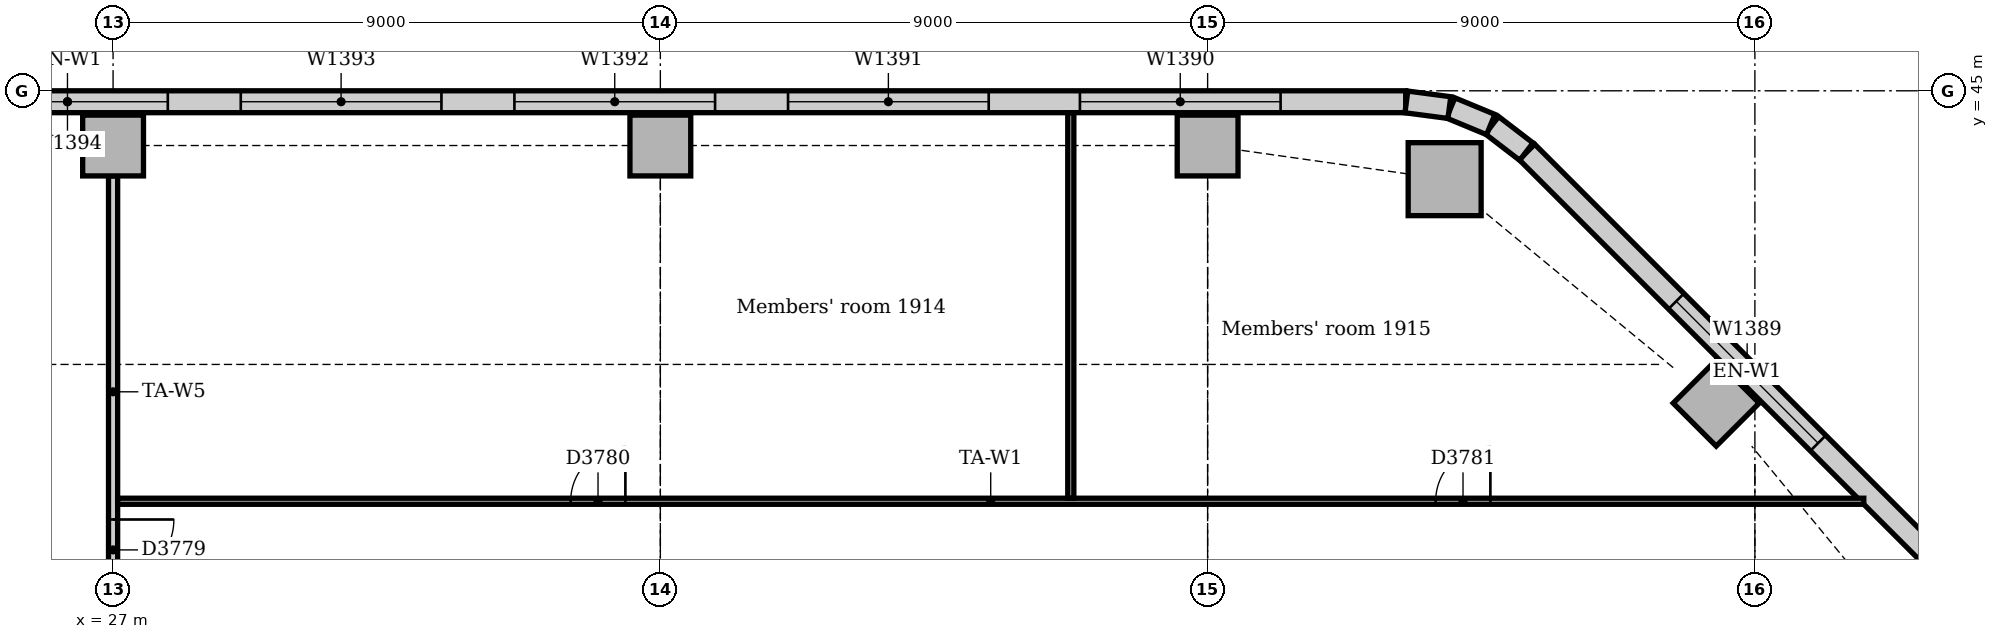
"""IFC4 building model, lengths in metres.
Left out: names, types, materials, properties, quantities, classifications, styles, units other than length and angle.
Written with IfcOpenShell. Run it as: python <this file> out.ifc"""

import sys

from ifc_helpers import new_model, si_unit, direction, frame, frame_2d, origin, origin_2d, place, context, subcontext, project, spatial, rectangle, extrude, element, fill, save


model = new_model("IFC4")
c1 = context("Model", 3, precision=1e-05, world=origin(), true_north=direction((0.0, 1.0)))
c2 = subcontext(c1, "Body", "Model", "MODEL_VIEW")
j1 = project(units=[si_unit("LENGTHUNIT", "METRE"), si_unit("PLANEANGLEUNIT", "RADIAN")], contexts=[c1])
p1 = place(None, origin())
s1 = spatial("IfcSite", under=j1, at=p1, CompositionType="ELEMENT")
p2 = place(p1, origin())
s2 = spatial("IfcBuilding", under=s1, at=p2, CompositionType="ELEMENT")
p3 = place(p2, frame((0.0, 0.0, 83.0)))
s3 = spatial("IfcBuildingStorey", under=s2, at=p3, CompositionType="ELEMENT", Elevation=83.0)
p4 = place(p3, frame((48.898, 43.547, 0.0), z_axis=(0.0, 0.0, 1.0), x_axis=(1.0, 0.0, 0.0)))
e1 = element("IfcColumn", 1, at=p4, inside=s3, PredefinedType="COLUMN", context=c2, shape_type="SweptSolid", body=[
    extrude(rectangle(XDim=1.2, YDim=1.2, at=origin_2d()), origin(), (0.0, 0.0, 1.0), 3.85),
])
for number, where, z_axis, x_axis in (
    (2, (53.364, 39.864, 0.0), (0.0, 0.0, 1.0), (0.707, 0.707, 0.0)),
    (3, (27.0, 44.1, 0.0), (0.0, 0.0, 1.0), (1.0, 0.0, 0.0)),
    (4, (36.0, 44.1, 0.0), (0.0, 0.0, 1.0), (1.0, 0.0, 0.0)),
    (5, (45.0, 44.1, 0.0), (0.0, 0.0, 1.0), (1.0, 0.0, 0.0)),
):
    element("IfcColumn", number, at=place(p3, frame(where, z_axis=z_axis, x_axis=x_axis)), inside=s3, PredefinedType="COLUMN", context=c2, shape_type="SweptSolid", body=[
        extrude(rectangle(XDim=1.0, YDim=1.0, at=origin_2d()), origin(), (0.0, 0.0, 1.0), 3.85),
    ])
p5 = place(p3, frame((57.494, 36.751, 0.0), z_axis=(0.0, 0.0, 1.0), x_axis=(-0.707106781187, 0.707106781187, 0.0)))
e6 = element("IfcWall", 6, at=p5, inside=s3, PredefinedType="STANDARD", context=c2, shape_type="SweptSolid", body=[
    extrude(rectangle(XDim=10.243, YDim=0.36, at=frame_2d((5.121, 0.0))), origin(), (0.0, 0.0, 1.0), 3.85),
])
p6 = place(p5, frame((3.471, 0.0, 0.9)))
e7 = element("IfcOpeningElement", 7, at=p6, cuts=e6, PredefinedType="OPENING", context=c2, shape_type="SweptSolid", body=[
    extrude(rectangle(XDim=3.3, YDim=1.6, at=frame_2d((1.65, 0.8))), frame((0.0, 0.19, 0.0), z_axis=(0.0, -1.0, 0.0), x_axis=(1.0, 0.0, 0.0)), (0.0, 0.0, 1.0), 0.38),
])
p7 = place(p3, frame((48.257, 44.82, 0.0), z_axis=(0.0, 0.0, 1.0), x_axis=(-1.0, 0.0, 0.0)))
e8 = element("IfcWall", 8, at=p7, inside=s3, PredefinedType="STANDARD", context=c2, shape_type="SweptSolid", body=[
    extrude(rectangle(XDim=44.015, YDim=0.36, at=frame_2d((22.007, 0.0))), origin(), (0.0, 0.0, 1.0), 3.85),
])
p8 = place(p7, frame((2.057, 0.0, 0.9)))
e9 = element("IfcOpeningElement", 9, at=p8, cuts=e8, PredefinedType="OPENING", context=c2, shape_type="SweptSolid", body=[
    extrude(rectangle(XDim=3.3, YDim=1.6, at=frame_2d((1.65, 0.8))), frame((0.0, 0.19, 0.0), z_axis=(0.0, -1.0, 0.0), x_axis=(1.0, 0.0, 0.0)), (0.0, 0.0, 1.0), 0.38),
])
p9 = place(p7, frame((6.857, 0.0, 0.9)))
e10 = element("IfcOpeningElement", 10, at=p9, cuts=e8, PredefinedType="OPENING", context=c2, shape_type="SweptSolid", body=[
    extrude(rectangle(XDim=3.3, YDim=1.6, at=frame_2d((1.65, 0.8))), frame((0.0, 0.19, 0.0), z_axis=(0.0, -1.0, 0.0), x_axis=(1.0, 0.0, 0.0)), (0.0, 0.0, 1.0), 0.38),
])
p10 = place(p7, frame((11.357, 0.0, 0.9)))
e11 = element("IfcOpeningElement", 11, at=p10, cuts=e8, PredefinedType="OPENING", context=c2, shape_type="SweptSolid", body=[
    extrude(rectangle(XDim=3.3, YDim=1.6, at=frame_2d((1.65, 0.8))), frame((0.0, 0.19, 0.0), z_axis=(0.0, -1.0, 0.0), x_axis=(1.0, 0.0, 0.0)), (0.0, 0.0, 1.0), 0.38),
])
p11 = place(p7, frame((15.857, 0.0, 0.9)))
e12 = element("IfcOpeningElement", 12, at=p11, cuts=e8, PredefinedType="OPENING", context=c2, shape_type="SweptSolid", body=[
    extrude(rectangle(XDim=3.3, YDim=1.6, at=frame_2d((1.65, 0.8))), frame((0.0, 0.19, 0.0), z_axis=(0.0, -1.0, 0.0), x_axis=(1.0, 0.0, 0.0)), (0.0, 0.0, 1.0), 0.38),
])
p12 = place(p7, frame((20.357, 0.0, 0.9)))
e13 = element("IfcOpeningElement", 13, at=p12, cuts=e8, PredefinedType="OPENING", context=c2, shape_type="SweptSolid", body=[
    extrude(rectangle(XDim=3.3, YDim=1.6, at=frame_2d((1.65, 0.8))), frame((0.0, 0.19, 0.0), z_axis=(0.0, -1.0, 0.0), x_axis=(1.0, 0.0, 0.0)), (0.0, 0.0, 1.0), 0.38),
])
p13 = place(p7, frame((25.957, 0.0, 0.9)))
e14 = element("IfcOpeningElement", 14, at=p13, cuts=e8, PredefinedType="OPENING", context=c2, shape_type="SweptSolid", body=[
    extrude(rectangle(XDim=1.8, YDim=1.6, at=frame_2d((0.9, 0.8))), frame((0.0, 0.19, 0.0), z_axis=(0.0, -1.0, 0.0), x_axis=(1.0, 0.0, 0.0)), (0.0, 0.0, 1.0), 0.38),
])
p14 = place(p7, frame((29.357, 0.0, 0.9)))
e15 = element("IfcOpeningElement", 15, at=p14, cuts=e8, PredefinedType="OPENING", context=c2, shape_type="SweptSolid", body=[
    extrude(rectangle(XDim=3.3, YDim=1.6, at=frame_2d((1.65, 0.8))), frame((0.0, 0.19, 0.0), z_axis=(0.0, -1.0, 0.0), x_axis=(1.0, 0.0, 0.0)), (0.0, 0.0, 1.0), 0.38),
])
p15 = place(p7, frame((33.857, 0.0, 0.9)))
e16 = element("IfcOpeningElement", 16, at=p15, cuts=e8, PredefinedType="OPENING", context=c2, shape_type="SweptSolid", body=[
    extrude(rectangle(XDim=3.3, YDim=1.6, at=frame_2d((1.65, 0.8))), frame((0.0, 0.19, 0.0), z_axis=(0.0, -1.0, 0.0), x_axis=(1.0, 0.0, 0.0)), (0.0, 0.0, 1.0), 0.38),
])
p16 = place(p7, frame((38.357, 0.0, 0.9)))
e17 = element("IfcOpeningElement", 17, at=p16, cuts=e8, PredefinedType="OPENING", context=c2, shape_type="SweptSolid", body=[
    extrude(rectangle(XDim=3.3, YDim=1.6, at=frame_2d((1.65, 0.8))), frame((0.0, 0.19, 0.0), z_axis=(0.0, -1.0, 0.0), x_axis=(1.0, 0.0, 0.0)), (0.0, 0.0, 1.0), 0.38),
])
p17 = place(p3, frame((50.241, 44.0, 0.0), z_axis=(0.0, 0.0, 1.0), x_axis=(-0.793321924995, 0.608802368033, 0.0)))
e18 = element("IfcWall", 18, at=p17, inside=s3, PredefinedType="STANDARD", context=c2, shape_type="SweptSolid", body=[
    extrude(rectangle(XDim=0.713, YDim=0.36, at=frame_2d((0.357, 0.0))), origin(), (0.0, 0.0, 1.0), 3.85),
])
for number, where, z_axis, x_axis in (
    (19, (49.656, 44.445, 0.0), (0.0, 0.0, 1.0), (-0.924, 0.383, 0.0)),
    (20, (48.976, 44.724, 0.0), (0.0, 0.0, 1.0), (-0.991, 0.131, 0.0)),
):
    element("IfcWall", number, at=place(p3, frame(where, z_axis=z_axis, x_axis=x_axis)), inside=s3, PredefinedType="STANDARD", context=c2, shape_type="SweptSolid", body=[
        extrude(rectangle(XDim=0.713, YDim=0.36, at=frame_2d((0.356, 0.0))), origin(), (0.0, 0.0, 1.0), 3.85),
    ])
p18 = place(p3, frame((27.0, 36.5, 0.0), z_axis=(0.0, 0.0, 1.0), x_axis=(0.0, 1.0, 0.0)))
e21 = element("IfcWall", 21, at=p18, inside=s3, PredefinedType="PARTITIONING", context=c2, shape_type="SweptSolid", body=[
    extrude(rectangle(XDim=7.1, YDim=0.15, at=frame_2d((3.55, 0.0))), origin(), (0.0, 0.0, 1.0), 3.158),
])
p19 = place(p18, frame((0.45, 0.0, 0.0)))
e22 = element("IfcOpeningElement", 22, at=p19, cuts=e21, PredefinedType="OPENING", context=c2, shape_type="SweptSolid", body=[
    extrude(rectangle(XDim=1.0, YDim=2.1, at=frame_2d((0.5, 1.05))), frame((0.0, 0.085, 0.0), z_axis=(0.0, -1.0, 0.0), x_axis=(1.0, 0.0, 0.0)), (0.0, 0.0, 1.0), 0.17),
])
p20 = place(p3, frame((27.075, 38.25, 0.0), z_axis=(0.0, 0.0, 1.0), x_axis=(1.0, 0.0, 0.0)))
e23 = element("IfcWall", 23, at=p20, inside=s3, PredefinedType="PARTITIONING", context=c2, shape_type="SweptSolid", body=[
    extrude(rectangle(XDim=28.716, YDim=0.1, at=frame_2d((14.358, 0.0))), origin(), (0.0, 0.0, 1.0), 3.85),
])
p21 = place(p20, frame((7.45, 0.0, 0.0)))
e24 = element("IfcOpeningElement", 24, at=p21, cuts=e23, PredefinedType="OPENING", context=c2, shape_type="SweptSolid", body=[
    extrude(rectangle(XDim=0.9, YDim=2.1, at=frame_2d((0.45, 1.05))), frame((0.0, 0.06, 0.0), z_axis=(0.0, -1.0, 0.0), x_axis=(1.0, 0.0, 0.0)), (0.0, 0.0, 1.0), 0.12),
])
p22 = place(p20, frame((21.675, 0.0, 0.0)))
e25 = element("IfcOpeningElement", 25, at=p22, cuts=e23, PredefinedType="OPENING", context=c2, shape_type="SweptSolid", body=[
    extrude(rectangle(XDim=0.9, YDim=2.1, at=frame_2d((0.45, 1.05))), frame((0.0, 0.06, 0.0), z_axis=(0.0, -1.0, 0.0), x_axis=(1.0, 0.0, 0.0)), (0.0, 0.0, 1.0), 0.12),
])
p23 = place(p3, frame((42.75, 38.3, 0.0), z_axis=(0.0, 0.0, 1.0), x_axis=(0.0, 1.0, 0.0)))
e26 = element("IfcWall", 26, at=p23, inside=s3, PredefinedType="PARTITIONING", context=c2, shape_type="SweptSolid", body=[
    extrude(rectangle(XDim=6.34, YDim=0.1, at=frame_2d((3.17, 0.0))), origin(), (0.0, 0.0, 1.0), 3.85),
])
p24 = place(p6, origin())
e27 = element("IfcWindow", 27, at=p24, inside=s3, PartitioningType="SINGLE_PANEL", PredefinedType="WINDOW", context=c2, shape_type="SweptSolid", body=[
    extrude(rectangle(XDim=3.3, YDim=1.6, at=frame_2d((1.65, 0.8))), frame((0.0, 0.13, 0.0), z_axis=(0.0, -1.0, 0.0), x_axis=(1.0, 0.0, 0.0)), (0.0, 0.0, 1.0), 0.06),
])
fill(e7, e27)
p25 = place(p8, origin())
e28 = element("IfcWindow", 28, at=p25, inside=s3, PartitioningType="SINGLE_PANEL", PredefinedType="WINDOW", context=c2, shape_type="SweptSolid", body=[
    extrude(rectangle(XDim=3.3, YDim=1.6, at=frame_2d((1.65, 0.8))), frame((0.0, 0.13, 0.0), z_axis=(0.0, -1.0, 0.0), x_axis=(1.0, 0.0, 0.0)), (0.0, 0.0, 1.0), 0.06),
])
fill(e9, e28)
p26 = place(p9, origin())
e29 = element("IfcWindow", 29, at=p26, inside=s3, PartitioningType="SINGLE_PANEL", PredefinedType="WINDOW", context=c2, shape_type="SweptSolid", body=[
    extrude(rectangle(XDim=3.3, YDim=1.6, at=frame_2d((1.65, 0.8))), frame((0.0, 0.13, 0.0), z_axis=(0.0, -1.0, 0.0), x_axis=(1.0, 0.0, 0.0)), (0.0, 0.0, 1.0), 0.06),
])
fill(e10, e29)
p27 = place(p10, origin())
e30 = element("IfcWindow", 30, at=p27, inside=s3, PartitioningType="SINGLE_PANEL", PredefinedType="WINDOW", context=c2, shape_type="SweptSolid", body=[
    extrude(rectangle(XDim=3.3, YDim=1.6, at=frame_2d((1.65, 0.8))), frame((0.0, 0.13, 0.0), z_axis=(0.0, -1.0, 0.0), x_axis=(1.0, 0.0, 0.0)), (0.0, 0.0, 1.0), 0.06),
])
fill(e11, e30)
p28 = place(p11, origin())
e31 = element("IfcWindow", 31, at=p28, inside=s3, PartitioningType="SINGLE_PANEL", PredefinedType="WINDOW", context=c2, shape_type="SweptSolid", body=[
    extrude(rectangle(XDim=3.3, YDim=1.6, at=frame_2d((1.65, 0.8))), frame((0.0, 0.13, 0.0), z_axis=(0.0, -1.0, 0.0), x_axis=(1.0, 0.0, 0.0)), (0.0, 0.0, 1.0), 0.06),
])
fill(e12, e31)
p29 = place(p12, origin())
e32 = element("IfcWindow", 32, at=p29, inside=s3, PartitioningType="SINGLE_PANEL", PredefinedType="WINDOW", context=c2, shape_type="SweptSolid", body=[
    extrude(rectangle(XDim=3.3, YDim=1.6, at=frame_2d((1.65, 0.8))), frame((0.0, 0.13, 0.0), z_axis=(0.0, -1.0, 0.0), x_axis=(1.0, 0.0, 0.0)), (0.0, 0.0, 1.0), 0.06),
])
fill(e13, e32)
p30 = place(p19, frame((1.0, 0.0, 0.0), z_axis=(0.0, 0.0, 1.0), x_axis=(-1.0, 0.0, 0.0)))
e33 = element("IfcDoor", 33, at=p30, inside=s3, OperationType="SINGLE_SWING_LEFT", PredefinedType="DOOR", context=c2, shape_type="SweptSolid", body=[
    extrude(rectangle(XDim=1.0, YDim=2.1, at=frame_2d((0.5, 1.05))), frame((0.0, 0.025, 0.0), z_axis=(0.0, -1.0, 0.0), x_axis=(1.0, 0.0, 0.0)), (0.0, 0.0, 1.0), 0.05),
])
fill(e22, e33)
p31 = place(p21, origin())
e34 = element("IfcDoor", 34, at=p31, inside=s3, OperationType="SINGLE_SWING_RIGHT", PredefinedType="DOOR", context=c2, shape_type="SweptSolid", body=[
    extrude(rectangle(XDim=0.9, YDim=2.1, at=frame_2d((0.45, 1.05))), frame((0.0, 0.025, 0.0), z_axis=(0.0, -1.0, 0.0), x_axis=(1.0, 0.0, 0.0)), (0.0, 0.0, 1.0), 0.05),
])
fill(e24, e34)
p32 = place(p22, origin())
e35 = element("IfcDoor", 35, at=p32, inside=s3, OperationType="SINGLE_SWING_RIGHT", PredefinedType="DOOR", context=c2, shape_type="SweptSolid", body=[
    extrude(rectangle(XDim=0.9, YDim=2.1, at=frame_2d((0.45, 1.05))), frame((0.0, 0.025, 0.0), z_axis=(0.0, -1.0, 0.0), x_axis=(1.0, 0.0, 0.0)), (0.0, 0.0, 1.0), 0.05),
])
fill(e25, e35)
save(model, sys.argv[1])
